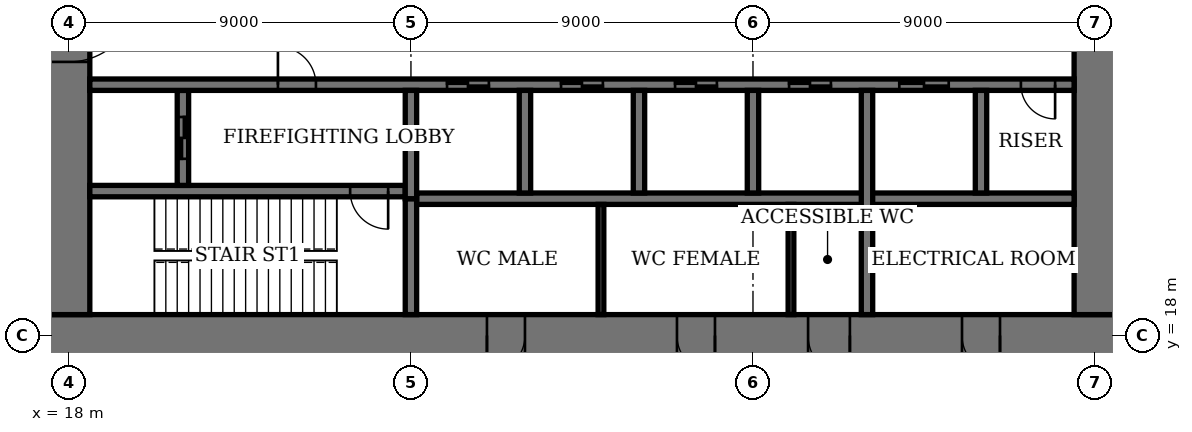
"""IFC4 building model, lengths in metres.
Left out: names, types, materials, properties, quantities, classifications, styles, units other than length and angle.
Written with IfcOpenShell. Run it as: python <this file> out.ifc"""

import sys

from ifc_helpers import new_model, si_unit, direction, frame, frame_2d, origin, place, context, subcontext, project, spatial, rectangle, extrude, element, fill, save


model = new_model("IFC4")
c1 = context("Model", 3, precision=1e-05, world=origin(), true_north=direction((0.0, 1.0)))
c2 = subcontext(c1, "Body", "Model", "MODEL_VIEW")
j1 = project(units=[si_unit("LENGTHUNIT", "METRE"), si_unit("PLANEANGLEUNIT", "RADIAN")], contexts=[c1])
p1 = place(None, origin())
s1 = spatial("IfcSite", under=j1, at=p1, CompositionType="ELEMENT")
p2 = place(p1, origin())
s2 = spatial("IfcBuilding", under=s1, at=p2, CompositionType="ELEMENT")
p3 = place(p2, frame((0.0, 0.0, 10.8)))
s3 = spatial("IfcBuildingStorey", under=s2, at=p3, CompositionType="ELEMENT", Elevation=10.8)
p4 = place(p3, frame((17.45, 18.0, 0.0), z_axis=(0.0, 0.0, 1.0), x_axis=(1.0, 0.0, 0.0)))
e1 = element("IfcWall", 1, at=p4, inside=s3, PredefinedType="SHEAR", context=c2, shape_type="SweptSolid", body=[
    extrude(rectangle(XDim=28.1, YDim=1.1, at=frame_2d((14.05, 0.0))), origin(), (0.0, 0.0, 1.0), 5.0),
])
p5 = place(p4, frame((11.55, 0.0, 0.0)))
e2 = element("IfcOpeningElement", 2, at=p5, cuts=e1, PredefinedType="OPENING", context=c2, shape_type="SweptSolid", body=[
    extrude(rectangle(XDim=1.0, YDim=2.4, at=frame_2d((0.5, 1.2))), frame((0.0, 0.56, 0.0), z_axis=(0.0, -1.0, 0.0), x_axis=(1.0, 0.0, 0.0)), (0.0, 0.0, 1.0), 1.12),
])
p6 = place(p4, frame((16.55, 0.0, 0.0)))
e3 = element("IfcOpeningElement", 3, at=p6, cuts=e1, PredefinedType="OPENING", context=c2, shape_type="SweptSolid", body=[
    extrude(rectangle(XDim=1.0, YDim=2.4, at=frame_2d((0.5, 1.2))), frame((0.0, 0.56, 0.0), z_axis=(0.0, -1.0, 0.0), x_axis=(1.0, 0.0, 0.0)), (0.0, 0.0, 1.0), 1.12),
])
p7 = place(p4, frame((20.0, 0.0, 0.0)))
e4 = element("IfcOpeningElement", 4, at=p7, cuts=e1, PredefinedType="OPENING", context=c2, shape_type="SweptSolid", body=[
    extrude(rectangle(XDim=1.1, YDim=2.4, at=frame_2d((0.55, 1.2))), frame((0.0, 0.56, 0.0), z_axis=(0.0, -1.0, 0.0), x_axis=(1.0, 0.0, 0.0)), (0.0, 0.0, 1.0), 1.12),
])
p8 = place(p4, frame((24.05, 0.0, 0.0)))
e5 = element("IfcOpeningElement", 5, at=p8, cuts=e1, PredefinedType="OPENING", context=c2, shape_type="SweptSolid", body=[
    extrude(rectangle(XDim=1.0, YDim=2.4, at=frame_2d((0.5, 1.2))), frame((0.0, 0.56, 0.0), z_axis=(0.0, -1.0, 0.0), x_axis=(1.0, 0.0, 0.0)), (0.0, 0.0, 1.0), 1.12),
])
p9 = place(p3, frame((18.0, 35.45, 0.0), z_axis=(0.0, 0.0, 1.0), x_axis=(0.0, -1.0, 0.0)))
e6 = element("IfcWall", 6, at=p9, inside=s3, PredefinedType="SHEAR", context=c2, shape_type="SweptSolid", body=[
    extrude(rectangle(XDim=16.9, YDim=1.1, at=frame_2d((8.45, 0.0))), origin(), (0.0, 0.0, 1.0), 5.0),
])
p10 = place(p9, frame((8.45, 0.0, 0.0)))
e7 = element("IfcOpeningElement", 7, at=p10, cuts=e6, PredefinedType="OPENING", context=c2, shape_type="SweptSolid", body=[
    extrude(rectangle(XDim=1.8, YDim=2.4, at=frame_2d((0.9, 1.2))), frame((0.0, 0.56, 0.0), z_axis=(0.0, -1.0, 0.0), x_axis=(1.0, 0.0, 0.0)), (0.0, 0.0, 1.0), 1.12),
])
p11 = place(p3, frame((45.0, 18.55, 0.0), z_axis=(0.0, 0.0, 1.0), x_axis=(0.0, 1.0, 0.0)))
e8 = element("IfcWall", 8, at=p11, inside=s3, PredefinedType="SHEAR", context=c2, shape_type="SweptSolid", body=[
    extrude(rectangle(XDim=16.9, YDim=1.1, at=frame_2d((8.45, 0.0))), origin(), (0.0, 0.0, 1.0), 5.0),
])
p12 = place(p11, frame((8.45, 0.0, 0.0)))
e9 = element("IfcOpeningElement", 9, at=p12, cuts=e8, PredefinedType="OPENING", context=c2, shape_type="SweptSolid", body=[
    extrude(rectangle(XDim=1.8, YDim=2.4, at=frame_2d((0.9, 1.2))), frame((0.0, 0.56, 0.0), z_axis=(0.0, -1.0, 0.0), x_axis=(1.0, 0.0, 0.0)), (0.0, 0.0, 1.0), 1.12),
])
p13 = place(p3, frame((18.55, 21.8, 0.0), z_axis=(0.0, 0.0, 1.0), x_axis=(1.0, 0.0, 0.0)))
e10 = element("IfcWall", 10, at=p13, inside=s3, PredefinedType="SHEAR", context=c2, shape_type="SweptSolid", body=[
    extrude(rectangle(XDim=8.3, YDim=0.3, at=frame_2d((4.15, 0.0))), origin(), (0.0, 0.0, 1.0), 5.0),
])
p14 = place(p13, frame((6.85, 0.0, 0.0)))
e11 = element("IfcOpeningElement", 11, at=p14, cuts=e10, PredefinedType="OPENING", context=c2, shape_type="SweptSolid", body=[
    extrude(rectangle(XDim=1.0, YDim=2.4, at=frame_2d((0.5, 1.2))), frame((0.0, 0.16, 0.0), z_axis=(0.0, -1.0, 0.0), x_axis=(1.0, 0.0, 0.0)), (0.0, 0.0, 1.0), 0.32),
])
p15 = place(p3, frame((27.0, 18.55, 0.0), z_axis=(0.0, 0.0, 1.0), x_axis=(0.0, 1.0, 0.0)))
e12 = element("IfcWall", 12, at=p15, inside=s3, PredefinedType="SHEAR", context=c2, shape_type="SweptSolid", body=[
    extrude(rectangle(XDim=3.05, YDim=0.3, at=frame_2d((1.525, 0.0))), origin(), (0.0, 0.0, 1.0), 5.0),
])
p16 = place(p3, frame((21.0, 21.95, 0.0), z_axis=(0.0, 0.0, 1.0), x_axis=(0.0, 1.0, 0.0)))
e13 = element("IfcWall", 13, at=p16, inside=s3, PredefinedType="SHEAR", context=c2, shape_type="SweptSolid", body=[
    extrude(rectangle(XDim=2.5, YDim=0.3, at=frame_2d((1.25, 0.0))), origin(), (0.0, 0.0, 1.0), 5.0),
])
p17 = place(p16, frame((0.7, 0.0, 0.0)))
e14 = element("IfcOpeningElement", 14, at=p17, cuts=e13, PredefinedType="OPENING", context=c2, shape_type="SweptSolid", body=[
    extrude(rectangle(XDim=1.1, YDim=2.4, at=frame_2d((0.55, 1.2))), frame((0.0, 0.16, 0.0), z_axis=(0.0, -1.0, 0.0), x_axis=(1.0, 0.0, 0.0)), (0.0, 0.0, 1.0), 0.32),
])
p18 = place(p3, frame((18.55, 24.6, 0.0), z_axis=(0.0, 0.0, 1.0), x_axis=(1.0, 0.0, 0.0)))
e15 = element("IfcWall", 15, at=p18, inside=s3, PredefinedType="SHEAR", context=c2, shape_type="SweptSolid", body=[
    extrude(rectangle(XDim=25.9, YDim=0.3, at=frame_2d((12.95, 0.0))), origin(), (0.0, 0.0, 1.0), 5.0),
])
p19 = place(p18, frame((4.95, 0.0, 0.0)))
e16 = element("IfcOpeningElement", 16, at=p19, cuts=e15, PredefinedType="OPENING", context=c2, shape_type="SweptSolid", body=[
    extrude(rectangle(XDim=1.0, YDim=2.4, at=frame_2d((0.5, 1.2))), frame((0.0, 0.16, 0.0), z_axis=(0.0, -1.0, 0.0), x_axis=(1.0, 0.0, 0.0)), (0.0, 0.0, 1.0), 0.32),
])
p20 = place(p18, frame((24.5, 0.0, 0.0)))
e17 = element("IfcOpeningElement", 17, at=p20, cuts=e15, PredefinedType="OPENING", context=c2, shape_type="SweptSolid", body=[
    extrude(rectangle(XDim=0.9, YDim=2.1, at=frame_2d((0.45, 1.05))), frame((0.0, 0.16, 0.0), z_axis=(0.0, -1.0, 0.0), x_axis=(1.0, 0.0, 0.0)), (0.0, 0.0, 1.0), 0.32),
])
p21 = place(p18, frame((9.4, 0.0, 0.0)))
e18 = element("IfcOpeningElement", 18, at=p21, cuts=e15, PredefinedType="OPENING", context=c2, shape_type="SweptSolid", body=[
    extrude(rectangle(XDim=1.1, YDim=2.4, at=frame_2d((0.55, 1.2))), frame((0.0, 0.16, 0.0), z_axis=(0.0, -1.0, 0.0), x_axis=(1.0, 0.0, 0.0)), (0.0, 0.0, 1.0), 0.32),
])
p22 = place(p18, frame((12.4, 0.0, 0.0)))
e19 = element("IfcOpeningElement", 19, at=p22, cuts=e15, PredefinedType="OPENING", context=c2, shape_type="SweptSolid", body=[
    extrude(rectangle(XDim=1.1, YDim=2.4, at=frame_2d((0.55, 1.2))), frame((0.0, 0.16, 0.0), z_axis=(0.0, -1.0, 0.0), x_axis=(1.0, 0.0, 0.0)), (0.0, 0.0, 1.0), 0.32),
])
p23 = place(p18, frame((15.4, 0.0, 0.0)))
e20 = element("IfcOpeningElement", 20, at=p23, cuts=e15, PredefinedType="OPENING", context=c2, shape_type="SweptSolid", body=[
    extrude(rectangle(XDim=1.1, YDim=2.4, at=frame_2d((0.55, 1.2))), frame((0.0, 0.16, 0.0), z_axis=(0.0, -1.0, 0.0), x_axis=(1.0, 0.0, 0.0)), (0.0, 0.0, 1.0), 0.32),
])
p24 = place(p18, frame((18.4, 0.0, 0.0)))
e21 = element("IfcOpeningElement", 21, at=p24, cuts=e15, PredefinedType="OPENING", context=c2, shape_type="SweptSolid", body=[
    extrude(rectangle(XDim=1.1, YDim=2.4, at=frame_2d((0.55, 1.2))), frame((0.0, 0.16, 0.0), z_axis=(0.0, -1.0, 0.0), x_axis=(1.0, 0.0, 0.0)), (0.0, 0.0, 1.0), 0.32),
])
p25 = place(p18, frame((21.3, 0.0, 0.0)))
e22 = element("IfcOpeningElement", 22, at=p25, cuts=e15, PredefinedType="OPENING", context=c2, shape_type="SweptSolid", body=[
    extrude(rectangle(XDim=1.3, YDim=2.4, at=frame_2d((0.65, 1.2))), frame((0.0, 0.16, 0.0), z_axis=(0.0, -1.0, 0.0), x_axis=(1.0, 0.0, 0.0)), (0.0, 0.0, 1.0), 0.32),
])
p26 = place(p3, frame((27.15, 21.6, 0.0), z_axis=(0.0, 0.0, 1.0), x_axis=(1.0, 0.0, 0.0)))
e23 = element("IfcWall", 23, at=p26, inside=s3, PredefinedType="SHEAR", context=c2, shape_type="SweptSolid", body=[
    extrude(rectangle(XDim=17.3, YDim=0.3, at=frame_2d((8.65, 0.0))), origin(), (0.0, 0.0, 1.0), 5.0),
])
for number, where, z_axis, x_axis in (
    (24, (30.0, 21.75, 0.0), (0.0, 0.0, 1.0), (0.0, 1.0, 0.0)),
    (25, (33.0, 21.75, 0.0), (0.0, 0.0, 1.0), (0.0, 1.0, 0.0)),
    (26, (36.0, 21.75, 0.0), (0.0, 0.0, 1.0), (0.0, 1.0, 0.0)),
):
    element("IfcWall", number, at=place(p3, frame(where, z_axis=z_axis, x_axis=x_axis)), inside=s3, PredefinedType="SHEAR", context=c2, shape_type="SweptSolid", body=[
        extrude(rectangle(XDim=2.7, YDim=0.3, at=frame_2d((1.35, 0.0))), origin(), (0.0, 0.0, 1.0), 5.0),
    ])
p27 = place(p3, frame((39.0, 18.55, 0.0), z_axis=(0.0, 0.0, 1.0), x_axis=(0.0, 1.0, 0.0)))
e27 = element("IfcWall", 27, at=p27, inside=s3, PredefinedType="SHEAR", context=c2, shape_type="SweptSolid", body=[
    extrude(rectangle(XDim=5.9, YDim=0.3, at=frame_2d((2.95, 0.0))), origin(), (0.0, 0.0, 1.0), 5.0),
])
p28 = place(p3, frame((42.0, 21.75, 0.0), z_axis=(0.0, 0.0, 1.0), x_axis=(0.0, 1.0, 0.0)))
e28 = element("IfcWall", 28, at=p28, inside=s3, PredefinedType="SHEAR", context=c2, shape_type="SweptSolid", body=[
    extrude(rectangle(XDim=2.7, YDim=0.3, at=frame_2d((1.35, 0.0))), origin(), (0.0, 0.0, 1.0), 5.0),
])
p29 = place(p3, frame((27.0, 21.6, 0.0), z_axis=(0.0, 0.0, 1.0), x_axis=(0.0, 1.0, 0.0)))
e29 = element("IfcWall", 29, at=p29, inside=s3, PredefinedType="SHEAR", context=c2, shape_type="SweptSolid", body=[
    extrude(rectangle(XDim=2.85, YDim=0.3, at=frame_2d((1.425, 0.0))), origin(), (0.0, 0.0, 1.0), 5.0),
])
for number, where, z_axis, x_axis in (
    (30, (32.0, 18.55, 0.0), (0.0, 0.0, 1.0), (0.0, 1.0, 0.0)),
    (31, (37.0, 18.55, 0.0), (0.0, 0.0, 1.0), (0.0, 1.0, 0.0)),
):
    element("IfcWall", number, at=place(p3, frame(where, z_axis=z_axis, x_axis=x_axis)), inside=s3, PredefinedType="PARTITIONING", context=c2, shape_type="SweptSolid", body=[
        extrude(rectangle(XDim=2.9, YDim=0.15, at=frame_2d((1.45, 0.0))), origin(), (0.0, 0.0, 1.0), 4.6),
    ])
p30 = place(p10, origin())
e32 = element("IfcDoor", 32, at=p30, inside=s3, OperationType="DOUBLE_DOOR_DOUBLE_SWING", PredefinedType="DOOR", context=c2, shape_type="SweptSolid", body=[
    extrude(rectangle(XDim=1.8, YDim=2.4, at=frame_2d((0.9, 1.2))), frame((0.0, 0.03, 0.0), z_axis=(0.0, -1.0, 0.0), x_axis=(1.0, 0.0, 0.0)), (0.0, 0.0, 1.0), 0.06),
    extrude(rectangle(XDim=0.04, YDim=2.4, at=frame_2d((0.02, 1.2))), frame((0.0, 0.55, 0.0), z_axis=(0.0, -1.0, 0.0), x_axis=(1.0, 0.0, 0.0)), (0.0, 0.0, 1.0), 1.1),
    extrude(rectangle(XDim=0.04, YDim=2.4, at=frame_2d((1.78, 1.2))), frame((0.0, 0.55, 0.0), z_axis=(0.0, -1.0, 0.0), x_axis=(1.0, 0.0, 0.0)), (0.0, 0.0, 1.0), 1.1),
    extrude(rectangle(XDim=1.8, YDim=0.04, at=frame_2d((0.9, 2.38))), frame((0.0, 0.55, 0.0), z_axis=(0.0, -1.0, 0.0), x_axis=(1.0, 0.0, 0.0)), (0.0, 0.0, 1.0), 1.1),
])
fill(e7, e32)
p31 = place(p5, origin())
e33 = element("IfcDoor", 33, at=p31, inside=s3, OperationType="SINGLE_SWING_LEFT", PredefinedType="DOOR", context=c2, shape_type="SweptSolid", body=[
    extrude(rectangle(XDim=1.0, YDim=2.4, at=frame_2d((0.5, 1.2))), frame((0.0, 0.025, 0.0), z_axis=(0.0, -1.0, 0.0), x_axis=(1.0, 0.0, 0.0)), (0.0, 0.0, 1.0), 0.05),
    extrude(rectangle(XDim=0.04, YDim=2.4, at=frame_2d((0.02, 1.2))), frame((0.0, 0.4, 0.0), z_axis=(0.0, -1.0, 0.0), x_axis=(1.0, 0.0, 0.0)), (0.0, 0.0, 1.0), 0.8),
    extrude(rectangle(XDim=0.04, YDim=2.4, at=frame_2d((0.98, 1.2))), frame((0.0, 0.4, 0.0), z_axis=(0.0, -1.0, 0.0), x_axis=(1.0, 0.0, 0.0)), (0.0, 0.0, 1.0), 0.8),
    extrude(rectangle(XDim=1.0, YDim=0.04, at=frame_2d((0.5, 2.38))), frame((0.0, 0.4, 0.0), z_axis=(0.0, -1.0, 0.0), x_axis=(1.0, 0.0, 0.0)), (0.0, 0.0, 1.0), 0.8),
])
fill(e2, e33)
p32 = place(p6, origin())
e34 = element("IfcDoor", 34, at=p32, inside=s3, OperationType="SINGLE_SWING_RIGHT", PredefinedType="DOOR", context=c2, shape_type="SweptSolid", body=[
    extrude(rectangle(XDim=1.0, YDim=2.4, at=frame_2d((0.5, 1.2))), frame((0.0, 0.025, 0.0), z_axis=(0.0, -1.0, 0.0), x_axis=(1.0, 0.0, 0.0)), (0.0, 0.0, 1.0), 0.05),
    extrude(rectangle(XDim=0.04, YDim=2.4, at=frame_2d((0.02, 1.2))), frame((0.0, 0.4, 0.0), z_axis=(0.0, -1.0, 0.0), x_axis=(1.0, 0.0, 0.0)), (0.0, 0.0, 1.0), 0.8),
    extrude(rectangle(XDim=0.04, YDim=2.4, at=frame_2d((0.98, 1.2))), frame((0.0, 0.4, 0.0), z_axis=(0.0, -1.0, 0.0), x_axis=(1.0, 0.0, 0.0)), (0.0, 0.0, 1.0), 0.8),
    extrude(rectangle(XDim=1.0, YDim=0.04, at=frame_2d((0.5, 2.38))), frame((0.0, 0.4, 0.0), z_axis=(0.0, -1.0, 0.0), x_axis=(1.0, 0.0, 0.0)), (0.0, 0.0, 1.0), 0.8),
])
fill(e3, e34)
p33 = place(p7, origin())
e35 = element("IfcDoor", 35, at=p33, inside=s3, OperationType="SINGLE_SWING_RIGHT", PredefinedType="DOOR", context=c2, shape_type="SweptSolid", body=[
    extrude(rectangle(XDim=1.1, YDim=2.4, at=frame_2d((0.55, 1.2))), frame((0.0, 0.025, 0.0), z_axis=(0.0, -1.0, 0.0), x_axis=(1.0, 0.0, 0.0)), (0.0, 0.0, 1.0), 0.05),
    extrude(rectangle(XDim=0.04, YDim=2.4, at=frame_2d((0.02, 1.2))), frame((0.0, 0.44, 0.0), z_axis=(0.0, -1.0, 0.0), x_axis=(1.0, 0.0, 0.0)), (0.0, 0.0, 1.0), 0.88),
    extrude(rectangle(XDim=0.04, YDim=2.4, at=frame_2d((1.08, 1.2))), frame((0.0, 0.44, 0.0), z_axis=(0.0, -1.0, 0.0), x_axis=(1.0, 0.0, 0.0)), (0.0, 0.0, 1.0), 0.88),
    extrude(rectangle(XDim=1.1, YDim=0.04, at=frame_2d((0.55, 2.38))), frame((0.0, 0.44, 0.0), z_axis=(0.0, -1.0, 0.0), x_axis=(1.0, 0.0, 0.0)), (0.0, 0.0, 1.0), 0.88),
])
fill(e4, e35)
p34 = place(p8, origin())
e36 = element("IfcDoor", 36, at=p34, inside=s3, OperationType="SINGLE_SWING_RIGHT", PredefinedType="DOOR", context=c2, shape_type="SweptSolid", body=[
    extrude(rectangle(XDim=1.0, YDim=2.4, at=frame_2d((0.5, 1.2))), frame((0.0, 0.025, 0.0), z_axis=(0.0, -1.0, 0.0), x_axis=(1.0, 0.0, 0.0)), (0.0, 0.0, 1.0), 0.05),
    extrude(rectangle(XDim=0.04, YDim=2.4, at=frame_2d((0.02, 1.2))), frame((0.0, 0.4, 0.0), z_axis=(0.0, -1.0, 0.0), x_axis=(1.0, 0.0, 0.0)), (0.0, 0.0, 1.0), 0.8),
    extrude(rectangle(XDim=0.04, YDim=2.4, at=frame_2d((0.98, 1.2))), frame((0.0, 0.4, 0.0), z_axis=(0.0, -1.0, 0.0), x_axis=(1.0, 0.0, 0.0)), (0.0, 0.0, 1.0), 0.8),
    extrude(rectangle(XDim=1.0, YDim=0.04, at=frame_2d((0.5, 2.38))), frame((0.0, 0.4, 0.0), z_axis=(0.0, -1.0, 0.0), x_axis=(1.0, 0.0, 0.0)), (0.0, 0.0, 1.0), 0.8),
])
fill(e5, e36)
p35 = place(p14, origin())
e37 = element("IfcDoor", 37, at=p35, inside=s3, OperationType="SINGLE_SWING_RIGHT", PredefinedType="DOOR", context=c2, shape_type="SweptSolid", body=[
    extrude(rectangle(XDim=1.0, YDim=2.4, at=frame_2d((0.5, 1.2))), frame((0.0, 0.03, 0.0), z_axis=(0.0, -1.0, 0.0), x_axis=(1.0, 0.0, 0.0)), (0.0, 0.0, 1.0), 0.06),
])
fill(e11, e37)
p36 = place(p19, origin())
e38 = element("IfcDoor", 38, at=p36, inside=s3, OperationType="SINGLE_SWING_RIGHT", PredefinedType="DOOR", context=c2, shape_type="SweptSolid", body=[
    extrude(rectangle(XDim=1.0, YDim=2.4, at=frame_2d((0.5, 1.2))), frame((0.0, 0.03, 0.0), z_axis=(0.0, -1.0, 0.0), x_axis=(1.0, 0.0, 0.0)), (0.0, 0.0, 1.0), 0.06),
])
fill(e16, e38)
p37 = place(p20, origin())
e39 = element("IfcDoor", 39, at=p37, inside=s3, OperationType="SINGLE_SWING_RIGHT", PredefinedType="DOOR", context=c2, shape_type="SweptSolid", body=[
    extrude(rectangle(XDim=0.9, YDim=2.1, at=frame_2d((0.45, 1.05))), frame((0.0, 0.03, 0.0), z_axis=(0.0, -1.0, 0.0), x_axis=(1.0, 0.0, 0.0)), (0.0, 0.0, 1.0), 0.06),
])
fill(e17, e39)
p38 = place(p21, origin())
e40 = element("IfcDoor", 40, at=p38, inside=s3, OperationType="DOUBLE_DOOR_SLIDING", PredefinedType="DOOR", context=c2, shape_type="SweptSolid", body=[
    extrude(rectangle(XDim=1.1, YDim=2.4, at=frame_2d((0.55, 1.2))), frame((0.0, 0.02, 0.0), z_axis=(0.0, -1.0, 0.0), x_axis=(1.0, 0.0, 0.0)), (0.0, 0.0, 1.0), 0.04),
])
fill(e18, e40)
p39 = place(p22, origin())
e41 = element("IfcDoor", 41, at=p39, inside=s3, OperationType="DOUBLE_DOOR_SLIDING", PredefinedType="DOOR", context=c2, shape_type="SweptSolid", body=[
    extrude(rectangle(XDim=1.1, YDim=2.4, at=frame_2d((0.55, 1.2))), frame((0.0, 0.02, 0.0), z_axis=(0.0, -1.0, 0.0), x_axis=(1.0, 0.0, 0.0)), (0.0, 0.0, 1.0), 0.04),
])
fill(e19, e41)
p40 = place(p23, origin())
e42 = element("IfcDoor", 42, at=p40, inside=s3, OperationType="DOUBLE_DOOR_SLIDING", PredefinedType="DOOR", context=c2, shape_type="SweptSolid", body=[
    extrude(rectangle(XDim=1.1, YDim=2.4, at=frame_2d((0.55, 1.2))), frame((0.0, 0.02, 0.0), z_axis=(0.0, -1.0, 0.0), x_axis=(1.0, 0.0, 0.0)), (0.0, 0.0, 1.0), 0.04),
])
fill(e20, e42)
p41 = place(p24, origin())
e43 = element("IfcDoor", 43, at=p41, inside=s3, OperationType="DOUBLE_DOOR_SLIDING", PredefinedType="DOOR", context=c2, shape_type="SweptSolid", body=[
    extrude(rectangle(XDim=1.1, YDim=2.4, at=frame_2d((0.55, 1.2))), frame((0.0, 0.02, 0.0), z_axis=(0.0, -1.0, 0.0), x_axis=(1.0, 0.0, 0.0)), (0.0, 0.0, 1.0), 0.04),
])
fill(e21, e43)
p42 = place(p25, origin())
e44 = element("IfcDoor", 44, at=p42, inside=s3, OperationType="DOUBLE_DOOR_SLIDING", PredefinedType="DOOR", context=c2, shape_type="SweptSolid", body=[
    extrude(rectangle(XDim=1.3, YDim=2.4, at=frame_2d((0.65, 1.2))), frame((0.0, 0.02, 0.0), z_axis=(0.0, -1.0, 0.0), x_axis=(1.0, 0.0, 0.0)), (0.0, 0.0, 1.0), 0.04),
])
fill(e22, e44)
p43 = place(p17, origin())
e45 = element("IfcDoor", 45, at=p43, inside=s3, OperationType="DOUBLE_DOOR_SLIDING", PredefinedType="DOOR", context=c2, shape_type="SweptSolid", body=[
    extrude(rectangle(XDim=1.1, YDim=2.4, at=frame_2d((0.55, 1.2))), frame((0.0, 0.03, 0.0), z_axis=(0.0, -1.0, 0.0), x_axis=(1.0, 0.0, 0.0)), (0.0, 0.0, 1.0), 0.06),
])
fill(e14, e45)
save(model, sys.argv[1])
